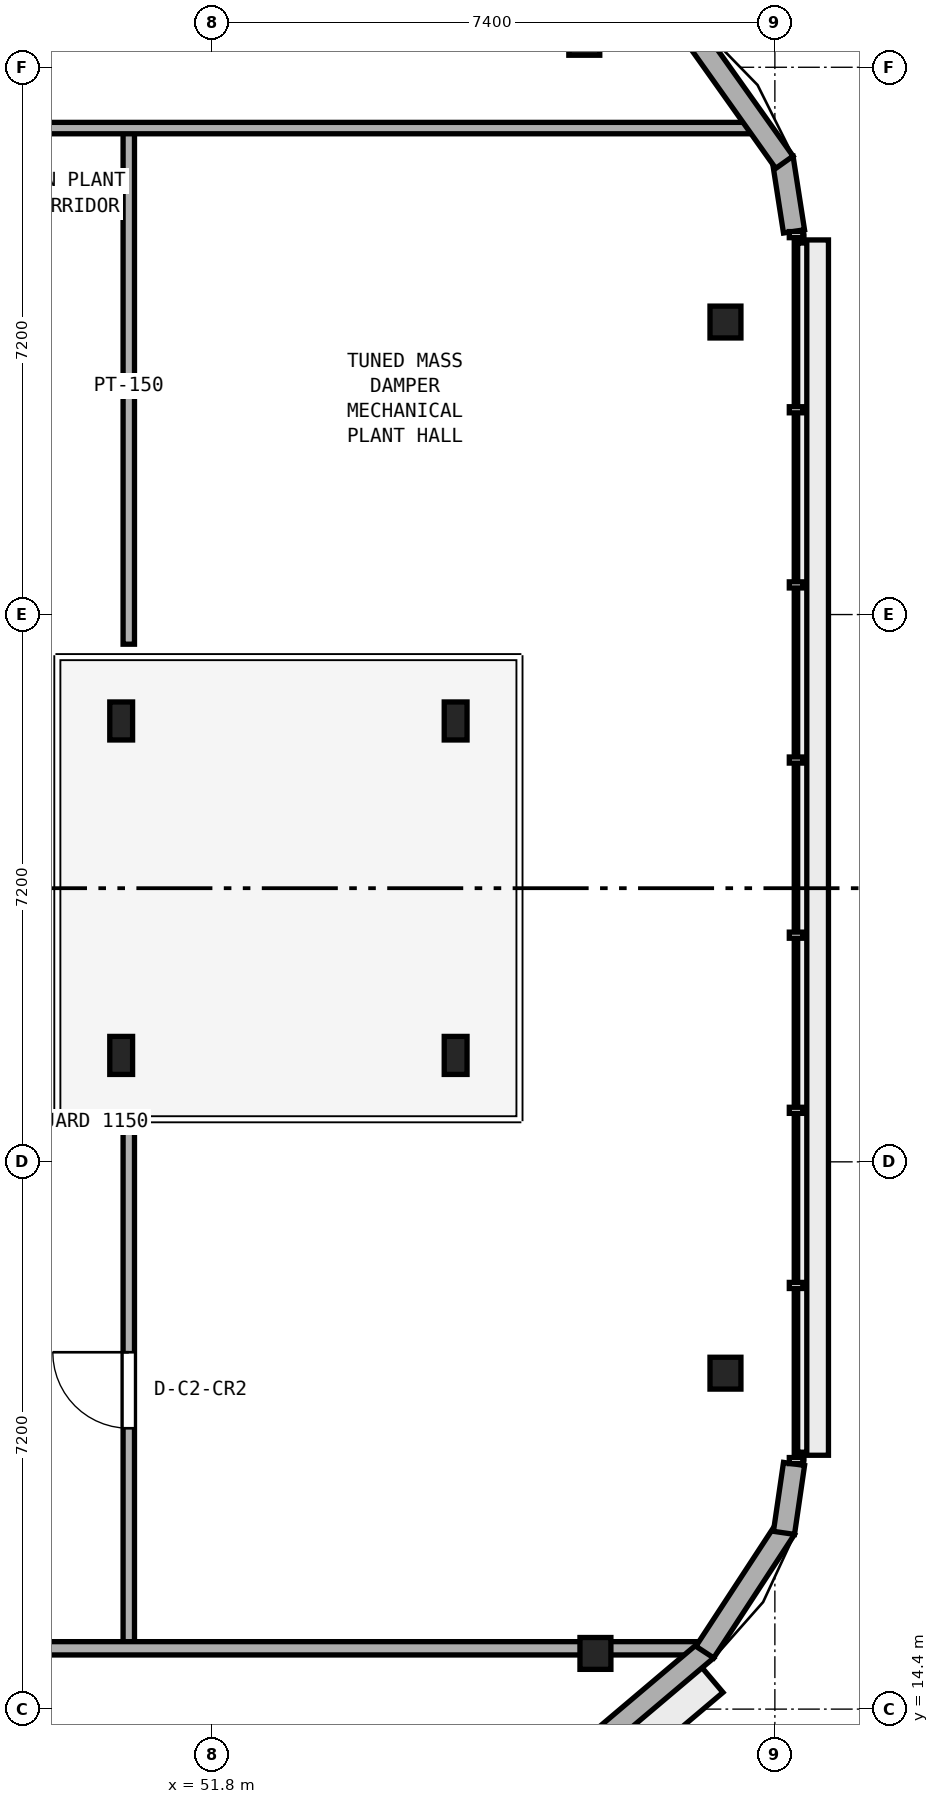
"""IFC4 building model, lengths in metres.
Left out: names, types, materials, properties, quantities, classifications, styles, units other than length and angle.
Written with IfcOpenShell. Run it as: python <this file> out.ifc"""

import sys

from ifc_helpers import new_model, si_unit, direction, frame, frame_2d, origin, origin_2d, place, context, subcontext, project, spatial, rectangle, i_section, extrude, element, fill, save


model = new_model("IFC4")
c1 = context("Model", 3, precision=1e-05, world=origin(), true_north=direction((0.0, 1.0)))
c2 = subcontext(c1, "Body", "Model", "MODEL_VIEW")
j1 = project(units=[si_unit("LENGTHUNIT", "METRE"), si_unit("PLANEANGLEUNIT", "RADIAN")], contexts=[c1])
p1 = place(None, origin())
s1 = spatial("IfcSite", under=j1, at=p1, CompositionType="ELEMENT")
p2 = place(p1, origin())
s2 = spatial("IfcBuilding", under=s1, at=p2, CompositionType="ELEMENT")
p3 = place(p2, frame((0.0, 0.0, 317.4)))
s3 = spatial("IfcBuildingStorey", under=s2, at=p3, CompositionType="ELEMENT", Elevation=317.4)
for number, where, z_axis, x_axis in (
    (1, (50.6, 23.0, 0.0), (0.0, 0.0, 1.0), (1.0, 0.0, 0.0)),
    (2, (55.0, 23.0, 0.0), (0.0, 0.0, 1.0), (1.0, 0.0, 0.0)),
    (3, (55.0, 27.4, 0.0), (0.0, 0.0, 1.0), (1.0, 0.0, 0.0)),
    (4, (50.6, 27.4, 0.0), (0.0, 0.0, 1.0), (1.0, 0.0, 0.0)),
):
    element("IfcColumn", number, at=place(p3, frame(where, z_axis=z_axis, x_axis=x_axis)), inside=s3, PredefinedType="COLUMN", context=c2, shape_type="SweptSolid", body=[
        extrude(i_section(OverallWidth=0.3, OverallDepth=0.5, WebThickness=0.014, FlangeThickness=0.028, at=origin_2d()), origin(), (0.0, 0.0, 1.0), 3.72),
    ])
for number, where, z_axis, x_axis in (
    (5, (56.839, 15.133, 0.0), (0.0, 0.0, 1.0), (1.0, 0.0, 0.0)),
    (6, (58.55, 18.82, 0.0), (0.0, 0.0, 1.0), (1.0, 0.0, 0.0)),
    (7, (58.55, 32.648, 0.0), (0.0, 0.0, 1.0), (1.0, 0.0, 0.0)),
    (8, (56.693, 36.368, 0.0), (0.0, 0.0, 1.0), (1.0, 0.0, 0.0)),
):
    element("IfcColumn", number, at=place(p3, frame(where, z_axis=z_axis, x_axis=x_axis)), inside=s3, PredefinedType="COLUMN", context=c2, shape_type="SweptSolid", body=[
        extrude(i_section(OverallWidth=0.407, OverallDepth=0.419, WebThickness=0.031, FlangeThickness=0.049, at=origin_2d()), origin(), (0.0, 0.0, 1.0), 4.0),
    ])
p4 = place(p3, frame((50.7, 15.2, 0.0), z_axis=(0.0, 0.0, 1.0), x_axis=(0.0, 1.0, 0.0)))
e9 = element("IfcWall", 9, at=p4, inside=s3, PredefinedType="PARTITIONING", context=c2, shape_type="SweptSolid", body=[
    extrude(rectangle(XDim=6.79, YDim=0.15, at=frame_2d((3.395, 0.0))), origin(), (0.0, 0.0, 1.0), 3.72),
])
p5 = place(p4, frame((2.895, 0.0, 0.0)))
e10 = element("IfcOpeningElement", 10, at=p5, cuts=e9, PredefinedType="OPENING", context=c2, shape_type="SweptSolid", body=[
    extrude(rectangle(XDim=1.0, YDim=2.12, at=frame_2d((0.5, 1.06))), frame((0.0, 0.085, 0.0), z_axis=(0.0, -1.0, 0.0), x_axis=(1.0, 0.0, 0.0)), (0.0, 0.0, 1.0), 0.17),
])
p6 = place(p3, frame((50.7, 28.41, 0.0), z_axis=(0.0, 0.0, 1.0), x_axis=(0.0, 1.0, 0.0)))
e11 = element("IfcWall", 11, at=p6, inside=s3, PredefinedType="PARTITIONING", context=c2, shape_type="SweptSolid", body=[
    extrude(rectangle(XDim=6.79, YDim=0.15, at=frame_2d((3.395, 0.0))), origin(), (0.0, 0.0, 1.0), 3.72),
])
p7 = place(p3, frame((19.292, 15.2, 0.0), z_axis=(0.0, 0.0, 1.0), x_axis=(1.0, 0.0, 0.0)))
e12 = element("IfcWall", 12, at=p7, inside=s3, PredefinedType="PARTITIONING", context=c2, shape_type="SweptSolid", body=[
    extrude(rectangle(XDim=39.076, YDim=0.175, at=frame_2d((19.538, 0.0))), origin(), (0.0, 0.0, 1.0), 2.37),
])
p8 = place(p7, frame((19.708, 0.0, 0.0)))
e13 = element("IfcOpeningElement", 13, at=p8, cuts=e12, PredefinedType="OPENING", context=c2, shape_type="SweptSolid", body=[
    extrude(rectangle(XDim=1.0, YDim=2.12, at=frame_2d((0.5, 1.06))), frame((0.0, 0.097, 0.0), z_axis=(0.0, -1.0, 0.0), x_axis=(1.0, 0.0, 0.0)), (0.0, 0.0, 1.0), 0.195),
])
p9 = place(p3, frame((20.01, 35.2, 0.0), z_axis=(0.0, 0.0, 1.0), x_axis=(1.0, 0.0, 0.0)))
e14 = element("IfcWall", 14, at=p9, inside=s3, PredefinedType="PARTITIONING", context=c2, shape_type="SweptSolid", body=[
    extrude(rectangle(XDim=39.04, YDim=0.15, at=frame_2d((19.52, 0.0))), origin(), (0.0, 0.0, 1.0), 2.37),
])
p10 = place(p9, frame((18.99, 0.0, 0.0)))
e15 = element("IfcOpeningElement", 15, at=p10, cuts=e14, PredefinedType="OPENING", context=c2, shape_type="SweptSolid", body=[
    extrude(rectangle(XDim=1.0, YDim=2.12, at=frame_2d((0.5, 1.06))), frame((0.0, 0.085, 0.0), z_axis=(0.0, -1.0, 0.0), x_axis=(1.0, 0.0, 0.0)), (0.0, 0.0, 1.0), 0.17),
])
p11 = place(p3, frame((47.908, 6.388, 0.0), z_axis=(0.0, 0.0, 1.0), x_axis=(0.763574643448, 0.645719570621, 0.0)))
e16 = element("IfcWall", 16, at=p11, inside=s3, PredefinedType="STANDARD", context=c2, shape_type="SweptSolid", body=[
    extrude(rectangle(XDim=13.616, YDim=0.28, at=frame_2d((6.808, 0.0))), origin(), (0.0, 0.0, 1.0), 3.72),
])
p12 = place(p11, frame((1.803, 0.0, 0.9)))
e17 = element("IfcOpeningElement", 17, at=p12, cuts=e16, PredefinedType="OPENING", context=c2, shape_type="SweptSolid", body=[
    extrude(rectangle(XDim=1.6, YDim=1.45, at=frame_2d((0.8, 0.725))), frame((0.0, 0.15, 0.0), z_axis=(0.0, -1.0, 0.0), x_axis=(1.0, 0.0, 0.0)), (0.0, 0.0, 1.0), 0.3),
])
p13 = place(p11, frame((6.008, 0.0, 0.9)))
e18 = element("IfcOpeningElement", 18, at=p13, cuts=e16, PredefinedType="OPENING", context=c2, shape_type="SweptSolid", body=[
    extrude(rectangle(XDim=1.6, YDim=1.45, at=frame_2d((0.8, 0.725))), frame((0.0, 0.15, 0.0), z_axis=(0.0, -1.0, 0.0), x_axis=(1.0, 0.0, 0.0)), (0.0, 0.0, 1.0), 0.3),
])
p14 = place(p11, frame((10.213, 0.0, 0.9)))
e19 = element("IfcOpeningElement", 19, at=p14, cuts=e16, PredefinedType="OPENING", context=c2, shape_type="SweptSolid", body=[
    extrude(rectangle(XDim=1.6, YDim=1.45, at=frame_2d((0.8, 0.725))), frame((0.0, 0.15, 0.0), z_axis=(0.0, -1.0, 0.0), x_axis=(1.0, 0.0, 0.0)), (0.0, 0.0, 1.0), 0.3),
])
p15 = place(p3, frame((58.278, 15.15, 0.0), z_axis=(0.0, 0.0, 1.0), x_axis=(0.547367908429, 0.836892091504, 0.0)))
e20 = element("IfcWall", 20, at=p15, inside=s3, PredefinedType="STANDARD", context=c2, shape_type="SweptSolid", body=[
    extrude(rectangle(XDim=1.942, YDim=0.28, at=frame_2d((0.971, 0.0))), origin(), (0.0, 0.0, 1.0), 3.72),
])
p16 = place(p3, frame((59.32, 16.719, 0.0), z_axis=(0.0, 0.0, 1.0), x_axis=(0.144404722788, 0.989518709291, 0.0)))
e21 = element("IfcWall", 21, at=p16, inside=s3, PredefinedType="STANDARD", context=c2, shape_type="SweptSolid", body=[
    extrude(rectangle(XDim=0.916, YDim=0.28, at=frame_2d((0.458, 0.0))), origin(), (0.0, 0.0, 1.0), 3.72),
])
p17 = place(p3, frame((59.452, 33.841, 0.0), z_axis=(0.0, 0.0, 1.0), x_axis=(-0.153890702538, 0.988087876493, 0.0)))
e22 = element("IfcWall", 22, at=p17, inside=s3, PredefinedType="STANDARD", context=c2, shape_type="SweptSolid", body=[
    extrude(rectangle(XDim=0.98, YDim=0.28, at=frame_2d((0.49, 0.0))), origin(), (0.0, 0.0, 1.0), 3.72),
])
p18 = place(p3, frame((59.325, 34.75, 0.0), z_axis=(0.0, 0.0, 1.0), x_axis=(-0.578944699304, 0.815366810183, 0.0)))
e23 = element("IfcWall", 23, at=p18, inside=s3, PredefinedType="STANDARD", context=c2, shape_type="SweptSolid", body=[
    extrude(rectangle(XDim=2.066, YDim=0.28, at=frame_2d((1.033, 0.0))), origin(), (0.0, 0.0, 1.0), 3.72),
])
p19 = place(p5, origin())
e24 = element("IfcDoor", 24, at=p19, inside=s3, OperationType="SINGLE_SWING_RIGHT", PredefinedType="DOOR", context=c2, shape_type="SweptSolid", body=[
    extrude(rectangle(XDim=1.0, YDim=2.12, at=frame_2d((0.5, 1.06))), frame((0.0, 0.025, 0.0), z_axis=(0.0, -1.0, 0.0), x_axis=(1.0, 0.0, 0.0)), (0.0, 0.0, 1.0), 0.05),
])
fill(e10, e24)
save(model, sys.argv[1])
